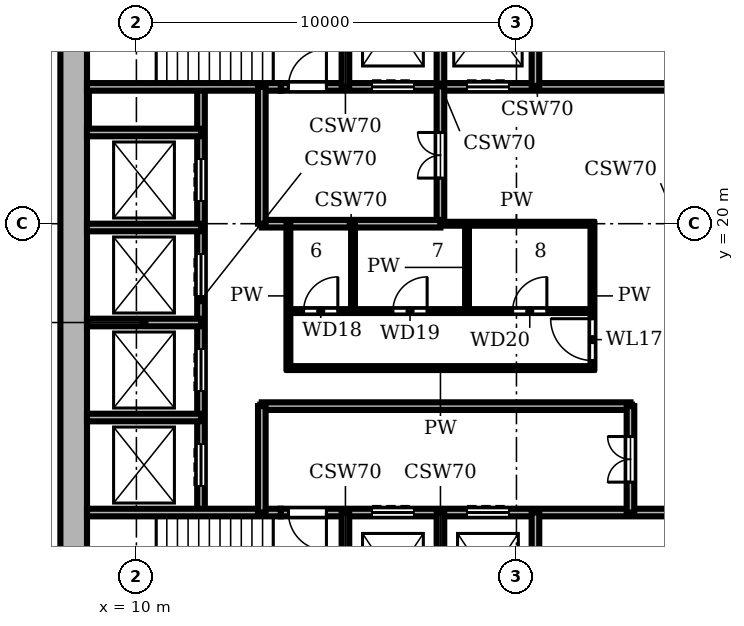
"""IFC4 building model, lengths in metres.
Left out: names, types, materials, properties, quantities, classifications, styles, units other than length and angle.
Written with IfcOpenShell. Run it as: python <this file> out.ifc"""

import sys

from ifc_helpers import new_model, si_unit, direction, frame, frame_2d, origin, place, context, subcontext, project, spatial, rectangle, extrude, element, fill, save


model = new_model("IFC4")
c1 = context("Model", 3, precision=1e-05, world=origin(), true_north=direction((0.0, 1.0)))
c2 = subcontext(c1, "Body", "Model", "MODEL_VIEW")
j1 = project(units=[si_unit("LENGTHUNIT", "METRE"), si_unit("PLANEANGLEUNIT", "RADIAN")], contexts=[c1])
p1 = place(None, origin())
s1 = spatial("IfcSite", under=j1, at=p1, CompositionType="ELEMENT")
p2 = place(p1, origin())
s2 = spatial("IfcBuilding", under=s1, at=p2, CompositionType="ELEMENT")
p3 = place(p2, frame((0.0, 0.0, 233.1)))
s3 = spatial("IfcBuildingStorey", under=s2, at=p3, CompositionType="ELEMENT", Elevation=233.1)
p4 = place(p3, frame((8.35, 27.3, 0.0), z_axis=(0.0, 0.0, 1.0), x_axis=(0.0, -1.0, 0.0)))
e1 = element("IfcWall", 1, at=p4, inside=s3, PredefinedType="SHEAR", context=c2, shape_type="SweptSolid", body=[
    extrude(rectangle(XDim=18.6, YDim=0.7, at=frame_2d((9.3, 0.0))), origin(), (0.0, 0.0, 1.0), 3.9),
])
p5 = place(p3, frame((8.7, 12.4, 0.0), z_axis=(0.0, 0.0, 1.0), x_axis=(1.0, 0.0, 0.0)))
e2 = element("IfcWall", 2, at=p5, inside=s3, PredefinedType="SHEAR", context=c2, shape_type="SweptSolid", body=[
    extrude(rectangle(XDim=5.1, YDim=0.2, at=frame_2d((2.55, 0.0))), origin(), (0.0, 0.0, 1.0), 3.45),
])
p6 = place(p3, frame((13.8, 12.4, 0.0), z_axis=(0.0, 0.0, 1.0), x_axis=(1.0, 0.0, 0.0)))
e3 = element("IfcWall", 3, at=p6, inside=s3, PredefinedType="SHEAR", context=c2, shape_type="SweptSolid", body=[
    extrude(rectangle(XDim=13.5, YDim=0.2, at=frame_2d((6.75, 0.0))), origin(), (0.0, 0.0, 1.0), 3.45),
])
p7 = place(p6, frame((2.4, 0.0, 0.0)))
e4 = element("IfcOpeningElement", 4, at=p7, cuts=e3, PredefinedType="OPENING", context=c2, shape_type="SweptSolid", body=[
    extrude(rectangle(XDim=1.1, YDim=2.1, at=frame_2d((0.55, 1.05))), frame((0.0, 0.11, 0.0), z_axis=(0.0, -1.0, 0.0), x_axis=(1.0, 0.0, 0.0)), (0.0, 0.0, 1.0), 0.22),
])
p8 = place(p6, frame((4.9, 0.0, 0.0)))
e5 = element("IfcOpeningElement", 5, at=p8, cuts=e3, PredefinedType="OPENING", context=c2, shape_type="SweptSolid", body=[
    extrude(rectangle(XDim=1.1, YDim=2.1, at=frame_2d((0.55, 1.05))), frame((0.0, 0.11, 0.0), z_axis=(0.0, -1.0, 0.0), x_axis=(1.0, 0.0, 0.0)), (0.0, 0.0, 1.0), 0.22),
])
p9 = place(p6, frame((0.2, 0.0, 0.0)))
e6 = element("IfcOpeningElement", 6, at=p9, cuts=e3, PredefinedType="OPENING", context=c2, shape_type="SweptSolid", body=[
    extrude(rectangle(XDim=1.0, YDim=2.1, at=frame_2d((0.5, 1.05))), frame((0.0, 0.11, 0.0), z_axis=(0.0, -1.0, 0.0), x_axis=(1.0, 0.0, 0.0)), (0.0, 0.0, 1.0), 0.22),
])
p10 = place(p3, frame((8.7, 14.9, 0.0), z_axis=(0.0, 0.0, 1.0), x_axis=(1.0, 0.0, 0.0)))
e7 = element("IfcWall", 7, at=p10, inside=s3, PredefinedType="SHEAR", context=c2, shape_type="SweptSolid", body=[
    extrude(rectangle(XDim=3.0, YDim=0.2, at=frame_2d((1.5, 0.0))), origin(), (0.0, 0.0, 1.0), 3.45),
])
p11 = place(p3, frame((13.3, 15.2, 0.0), z_axis=(0.0, 0.0, 1.0), x_axis=(1.0, 0.0, 0.0)))
e8 = element("IfcWall", 8, at=p11, inside=s3, PredefinedType="SHEAR", context=c2, shape_type="SweptSolid", body=[
    extrude(rectangle(XDim=9.7, YDim=0.2, at=frame_2d((4.85, 0.0))), origin(), (0.0, 0.0, 1.0), 3.45),
])
p12 = place(p3, frame((14.0, 16.2, 0.0), z_axis=(0.0, 0.0, 1.0), x_axis=(1.0, 0.0, 0.0)))
e9 = element("IfcWall", 9, at=p12, inside=s3, PredefinedType="PARTITIONING", context=c2, shape_type="SweptSolid", body=[
    extrude(rectangle(XDim=8.0, YDim=0.1, at=frame_2d((4.0, 0.0))), origin(), (0.0, 0.0, 1.0), 3.45),
])
p13 = place(p3, frame((8.7, 17.4, 0.0), z_axis=(0.0, 0.0, 1.0), x_axis=(1.0, 0.0, 0.0)))
e10 = element("IfcWall", 10, at=p13, inside=s3, PredefinedType="SHEAR", context=c2, shape_type="SweptSolid", body=[
    extrude(rectangle(XDim=3.0, YDim=0.2, at=frame_2d((1.5, 0.0))), origin(), (0.0, 0.0, 1.0), 3.45),
])
p14 = place(p3, frame((14.0, 17.7, 0.0), z_axis=(0.0, 0.0, 1.0), x_axis=(1.0, 0.0, 0.0)))
e11 = element("IfcWall", 11, at=p14, inside=s3, PredefinedType="PARTITIONING", context=c2, shape_type="SweptSolid", body=[
    extrude(rectangle(XDim=8.0, YDim=0.1, at=frame_2d((4.0, 0.0))), origin(), (0.0, 0.0, 1.0), 3.45),
])
p15 = place(p14, frame((0.4, 0.0, 0.0)))
e12 = element("IfcOpeningElement", 12, at=p15, cuts=e11, PredefinedType="OPENING", context=c2, shape_type="SweptSolid", body=[
    extrude(rectangle(XDim=0.9, YDim=2.1, at=frame_2d((0.45, 1.05))), frame((0.0, 0.06, 0.0), z_axis=(0.0, -1.0, 0.0), x_axis=(1.0, 0.0, 0.0)), (0.0, 0.0, 1.0), 0.12),
])
p16 = place(p14, frame((2.75, 0.0, 0.0)))
e13 = element("IfcOpeningElement", 13, at=p16, cuts=e11, PredefinedType="OPENING", context=c2, shape_type="SweptSolid", body=[
    extrude(rectangle(XDim=0.9, YDim=2.1, at=frame_2d((0.45, 1.05))), frame((0.0, 0.06, 0.0), z_axis=(0.0, -1.0, 0.0), x_axis=(1.0, 0.0, 0.0)), (0.0, 0.0, 1.0), 0.12),
])
p17 = place(p14, frame((5.9, 0.0, 0.0)))
e14 = element("IfcOpeningElement", 14, at=p17, cuts=e11, PredefinedType="OPENING", context=c2, shape_type="SweptSolid", body=[
    extrude(rectangle(XDim=0.9, YDim=2.1, at=frame_2d((0.45, 1.05))), frame((0.0, 0.06, 0.0), z_axis=(0.0, -1.0, 0.0), x_axis=(1.0, 0.0, 0.0)), (0.0, 0.0, 1.0), 0.12),
])
p18 = place(p3, frame((8.7, 19.9, 0.0), z_axis=(0.0, 0.0, 1.0), x_axis=(1.0, 0.0, 0.0)))
e15 = element("IfcWall", 15, at=p18, inside=s3, PredefinedType="SHEAR", context=c2, shape_type="SweptSolid", body=[
    extrude(rectangle(XDim=3.0, YDim=0.2, at=frame_2d((1.5, 0.0))), origin(), (0.0, 0.0, 1.0), 3.45),
])
p19 = place(p3, frame((18.0, 20.0, 0.0), z_axis=(0.0, 0.0, 1.0), x_axis=(1.0, 0.0, 0.0)))
e16 = element("IfcWall", 16, at=p19, inside=s3, PredefinedType="PARTITIONING", context=c2, shape_type="SweptSolid", body=[
    extrude(rectangle(XDim=4.0, YDim=0.1, at=frame_2d((2.0, 0.0))), origin(), (0.0, 0.0, 1.0), 3.45),
])
p20 = place(p3, frame((13.3, 20.0, 0.0), z_axis=(0.0, 0.0, 1.0), x_axis=(1.0, 0.0, 0.0)))
e17 = element("IfcWall", 17, at=p20, inside=s3, PredefinedType="SHEAR", context=c2, shape_type="SweptSolid", body=[
    extrude(rectangle(XDim=4.7, YDim=0.2, at=frame_2d((2.35, 0.0))), origin(), (0.0, 0.0, 1.0), 3.45),
])
p21 = place(p3, frame((8.7, 22.4, 0.0), z_axis=(0.0, 0.0, 1.0), x_axis=(1.0, 0.0, 0.0)))
e18 = element("IfcWall", 18, at=p21, inside=s3, PredefinedType="SHEAR", context=c2, shape_type="SweptSolid", body=[
    extrude(rectangle(XDim=3.0, YDim=0.2, at=frame_2d((1.5, 0.0))), origin(), (0.0, 0.0, 1.0), 3.45),
])
p22 = place(p3, frame((8.7, 23.6, 0.0), z_axis=(0.0, 0.0, 1.0), x_axis=(1.0, 0.0, 0.0)))
e19 = element("IfcWall", 19, at=p22, inside=s3, PredefinedType="SHEAR", context=c2, shape_type="SweptSolid", body=[
    extrude(rectangle(XDim=5.1, YDim=0.2, at=frame_2d((2.55, 0.0))), origin(), (0.0, 0.0, 1.0), 3.45),
])
p23 = place(p3, frame((13.8, 23.6, 0.0), z_axis=(0.0, 0.0, 1.0), x_axis=(1.0, 0.0, 0.0)))
e20 = element("IfcWall", 20, at=p23, inside=s3, PredefinedType="SHEAR", context=c2, shape_type="SweptSolid", body=[
    extrude(rectangle(XDim=13.5, YDim=0.2, at=frame_2d((6.75, 0.0))), origin(), (0.0, 0.0, 1.0), 3.45),
])
p24 = place(p23, frame((2.4, 0.0, 0.0)))
e21 = element("IfcOpeningElement", 21, at=p24, cuts=e20, PredefinedType="OPENING", context=c2, shape_type="SweptSolid", body=[
    extrude(rectangle(XDim=1.1, YDim=2.1, at=frame_2d((0.55, 1.05))), frame((0.0, 0.11, 0.0), z_axis=(0.0, -1.0, 0.0), x_axis=(1.0, 0.0, 0.0)), (0.0, 0.0, 1.0), 0.22),
])
p25 = place(p23, frame((4.9, 0.0, 0.0)))
e22 = element("IfcOpeningElement", 22, at=p25, cuts=e20, PredefinedType="OPENING", context=c2, shape_type="SweptSolid", body=[
    extrude(rectangle(XDim=1.1, YDim=2.1, at=frame_2d((0.55, 1.05))), frame((0.0, 0.11, 0.0), z_axis=(0.0, -1.0, 0.0), x_axis=(1.0, 0.0, 0.0)), (0.0, 0.0, 1.0), 0.22),
])
p26 = place(p23, frame((0.2, 0.0, 0.0)))
e23 = element("IfcOpeningElement", 23, at=p26, cuts=e20, PredefinedType="OPENING", context=c2, shape_type="SweptSolid", body=[
    extrude(rectangle(XDim=1.0, YDim=2.1, at=frame_2d((0.5, 1.05))), frame((0.0, 0.11, 0.0), z_axis=(0.0, -1.0, 0.0), x_axis=(1.0, 0.0, 0.0)), (0.0, 0.0, 1.0), 0.22),
])
p27 = place(p3, frame((11.7, 12.4, 0.0), z_axis=(0.0, 0.0, 1.0), x_axis=(0.0, 1.0, 0.0)))
e24 = element("IfcWall", 24, at=p27, inside=s3, PredefinedType="SHEAR", context=c2, shape_type="SweptSolid", body=[
    extrude(rectangle(XDim=11.2, YDim=0.2, at=frame_2d((5.6, 0.0))), origin(), (0.0, 0.0, 1.0), 3.45),
])
p28 = place(p27, frame((0.7, 0.0, 0.0)))
e25 = element("IfcOpeningElement", 25, at=p28, cuts=e24, PredefinedType="OPENING", context=c2, shape_type="SweptSolid", body=[
    extrude(rectangle(XDim=1.1, YDim=2.1, at=frame_2d((0.55, 1.05))), frame((0.0, 0.11, 0.0), z_axis=(0.0, -1.0, 0.0), x_axis=(1.0, 0.0, 0.0)), (0.0, 0.0, 1.0), 0.22),
])
p29 = place(p27, frame((3.2, 0.0, 0.0)))
e26 = element("IfcOpeningElement", 26, at=p29, cuts=e24, PredefinedType="OPENING", context=c2, shape_type="SweptSolid", body=[
    extrude(rectangle(XDim=1.1, YDim=2.1, at=frame_2d((0.55, 1.05))), frame((0.0, 0.11, 0.0), z_axis=(0.0, -1.0, 0.0), x_axis=(1.0, 0.0, 0.0)), (0.0, 0.0, 1.0), 0.22),
])
p30 = place(p27, frame((5.7, 0.0, 0.0)))
e27 = element("IfcOpeningElement", 27, at=p30, cuts=e24, PredefinedType="OPENING", context=c2, shape_type="SweptSolid", body=[
    extrude(rectangle(XDim=1.1, YDim=2.1, at=frame_2d((0.55, 1.05))), frame((0.0, 0.11, 0.0), z_axis=(0.0, -1.0, 0.0), x_axis=(1.0, 0.0, 0.0)), (0.0, 0.0, 1.0), 0.22),
])
p31 = place(p27, frame((8.2, 0.0, 0.0)))
e28 = element("IfcOpeningElement", 28, at=p31, cuts=e24, PredefinedType="OPENING", context=c2, shape_type="SweptSolid", body=[
    extrude(rectangle(XDim=1.1, YDim=2.1, at=frame_2d((0.55, 1.05))), frame((0.0, 0.11, 0.0), z_axis=(0.0, -1.0, 0.0), x_axis=(1.0, 0.0, 0.0)), (0.0, 0.0, 1.0), 0.22),
])
p32 = place(p3, frame((13.3, 12.4, 0.0), z_axis=(0.0, 0.0, 1.0), x_axis=(0.0, 1.0, 0.0)))
e29 = element("IfcWall", 29, at=p32, inside=s3, PredefinedType="SHEAR", context=c2, shape_type="SweptSolid", body=[
    extrude(rectangle(XDim=2.8, YDim=0.2, at=frame_2d((1.4, 0.0))), origin(), (0.0, 0.0, 1.0), 3.45),
])
p33 = place(p3, frame((13.3, 20.0, 0.0), z_axis=(0.0, 0.0, 1.0), x_axis=(0.0, 1.0, 0.0)))
e30 = element("IfcWall", 30, at=p33, inside=s3, PredefinedType="SHEAR", context=c2, shape_type="SweptSolid", body=[
    extrude(rectangle(XDim=3.6, YDim=0.2, at=frame_2d((1.8, 0.0))), origin(), (0.0, 0.0, 1.0), 3.45),
])
p34 = place(p3, frame((14.0, 16.2, 0.0), z_axis=(0.0, 0.0, 1.0), x_axis=(0.0, 1.0, 0.0)))
e31 = element("IfcWall", 31, at=p34, inside=s3, PredefinedType="PARTITIONING", context=c2, shape_type="SweptSolid", body=[
    extrude(rectangle(XDim=3.8, YDim=0.1, at=frame_2d((1.9, 0.0))), origin(), (0.0, 0.0, 1.0), 3.45),
])
for number, where, z_axis, x_axis in (
    (32, (15.5, 8.7, 0.0), (0.0, 0.0, 1.0), (0.0, 1.0, 0.0)),
    (33, (15.5, 23.6, 0.0), (0.0, 0.0, 1.0), (0.0, 1.0, 0.0)),
):
    element("IfcWall", number, at=place(p3, frame(where, z_axis=z_axis, x_axis=x_axis)), inside=s3, PredefinedType="SHEAR", context=c2, shape_type="SweptSolid", body=[
        extrude(rectangle(XDim=3.7, YDim=0.2, at=frame_2d((1.85, 0.0))), origin(), (0.0, 0.0, 1.0), 3.45),
    ])
p35 = place(p3, frame((15.7, 17.7, 0.0), z_axis=(0.0, 0.0, 1.0), x_axis=(0.0, 1.0, 0.0)))
e34 = element("IfcWall", 34, at=p35, inside=s3, PredefinedType="PARTITIONING", context=c2, shape_type="SweptSolid", body=[
    extrude(rectangle(XDim=2.3, YDim=0.1, at=frame_2d((1.15, 0.0))), origin(), (0.0, 0.0, 1.0), 3.45),
])
p36 = place(p3, frame((18.0, 8.7, 0.0), z_axis=(0.0, 0.0, 1.0), x_axis=(0.0, 1.0, 0.0)))
e35 = element("IfcWall", 35, at=p36, inside=s3, PredefinedType="SHEAR", context=c2, shape_type="SweptSolid", body=[
    extrude(rectangle(XDim=3.7, YDim=0.2, at=frame_2d((1.85, 0.0))), origin(), (0.0, 0.0, 1.0), 3.45),
])
p37 = place(p3, frame((18.0, 20.0, 0.0), z_axis=(0.0, 0.0, 1.0), x_axis=(0.0, 1.0, 0.0)))
e36 = element("IfcWall", 36, at=p37, inside=s3, PredefinedType="SHEAR", context=c2, shape_type="SweptSolid", body=[
    extrude(rectangle(XDim=7.3, YDim=0.2, at=frame_2d((3.65, 0.0))), origin(), (0.0, 0.0, 1.0), 3.45),
])
p38 = place(p37, frame((1.2, 0.0, 0.0)))
e37 = element("IfcOpeningElement", 37, at=p38, cuts=e36, PredefinedType="OPENING", context=c2, shape_type="SweptSolid", body=[
    extrude(rectangle(XDim=1.2, YDim=2.1, at=frame_2d((0.6, 1.05))), frame((0.0, 0.11, 0.0), z_axis=(0.0, -1.0, 0.0), x_axis=(1.0, 0.0, 0.0)), (0.0, 0.0, 1.0), 0.22),
])
p39 = place(p3, frame((18.7, 17.7, 0.0), z_axis=(0.0, 0.0, 1.0), x_axis=(0.0, 1.0, 0.0)))
e38 = element("IfcWall", 38, at=p39, inside=s3, PredefinedType="PARTITIONING", context=c2, shape_type="SweptSolid", body=[
    extrude(rectangle(XDim=2.3, YDim=0.1, at=frame_2d((1.15, 0.0))), origin(), (0.0, 0.0, 1.0), 3.45),
])
for number, where, z_axis, x_axis in (
    (39, (20.5, 8.7, 0.0), (0.0, 0.0, 1.0), (0.0, 1.0, 0.0)),
    (40, (20.5, 23.6, 0.0), (0.0, 0.0, 1.0), (0.0, 1.0, 0.0)),
):
    element("IfcWall", number, at=place(p3, frame(where, z_axis=z_axis, x_axis=x_axis)), inside=s3, PredefinedType="SHEAR", context=c2, shape_type="SweptSolid", body=[
        extrude(rectangle(XDim=3.7, YDim=0.2, at=frame_2d((1.85, 0.0))), origin(), (0.0, 0.0, 1.0), 3.45),
    ])
p40 = place(p3, frame((22.0, 16.2, 0.0), z_axis=(0.0, 0.0, 1.0), x_axis=(0.0, 1.0, 0.0)))
e41 = element("IfcWall", 41, at=p40, inside=s3, PredefinedType="PARTITIONING", context=c2, shape_type="SweptSolid", body=[
    extrude(rectangle(XDim=3.8, YDim=0.1, at=frame_2d((1.9, 0.0))), origin(), (0.0, 0.0, 1.0), 3.45),
])
p41 = place(p40, frame((0.2, 0.0, 0.0)))
e42 = element("IfcOpeningElement", 42, at=p41, cuts=e41, PredefinedType="OPENING", context=c2, shape_type="SweptSolid", body=[
    extrude(rectangle(XDim=1.1, YDim=2.1, at=frame_2d((0.55, 1.05))), frame((0.0, 0.06, 0.0), z_axis=(0.0, -1.0, 0.0), x_axis=(1.0, 0.0, 0.0)), (0.0, 0.0, 1.0), 0.12),
])
p42 = place(p3, frame((23.0, 12.4, 0.0), z_axis=(0.0, 0.0, 1.0), x_axis=(0.0, 1.0, 0.0)))
e43 = element("IfcWall", 43, at=p42, inside=s3, PredefinedType="SHEAR", context=c2, shape_type="SweptSolid", body=[
    extrude(rectangle(XDim=2.8, YDim=0.2, at=frame_2d((1.4, 0.0))), origin(), (0.0, 0.0, 1.0), 3.45),
])
p43 = place(p42, frame((0.8, 0.0, 0.0)))
e44 = element("IfcOpeningElement", 44, at=p43, cuts=e43, PredefinedType="OPENING", context=c2, shape_type="SweptSolid", body=[
    extrude(rectangle(XDim=1.2, YDim=2.1, at=frame_2d((0.6, 1.05))), frame((0.0, 0.11, 0.0), z_axis=(0.0, -1.0, 0.0), x_axis=(1.0, 0.0, 0.0)), (0.0, 0.0, 1.0), 0.22),
])
p44 = place(p28, origin())
e45 = element("IfcDoor", 45, at=p44, inside=s3, OperationType="DOUBLE_DOOR_SLIDING", PredefinedType="DOOR", context=c2, shape_type="SweptSolid", body=[
    extrude(rectangle(XDim=1.1, YDim=2.1, at=frame_2d((0.55, 1.05))), frame((0.0, 0.025, 0.0), z_axis=(0.0, -1.0, 0.0), x_axis=(1.0, 0.0, 0.0)), (0.0, 0.0, 1.0), 0.05),
])
fill(e25, e45)
p45 = place(p29, origin())
e46 = element("IfcDoor", 46, at=p45, inside=s3, OperationType="DOUBLE_DOOR_SLIDING", PredefinedType="DOOR", context=c2, shape_type="SweptSolid", body=[
    extrude(rectangle(XDim=1.1, YDim=2.1, at=frame_2d((0.55, 1.05))), frame((0.0, 0.025, 0.0), z_axis=(0.0, -1.0, 0.0), x_axis=(1.0, 0.0, 0.0)), (0.0, 0.0, 1.0), 0.05),
])
fill(e26, e46)
p46 = place(p30, origin())
e47 = element("IfcDoor", 47, at=p46, inside=s3, OperationType="DOUBLE_DOOR_SLIDING", PredefinedType="DOOR", context=c2, shape_type="SweptSolid", body=[
    extrude(rectangle(XDim=1.1, YDim=2.1, at=frame_2d((0.55, 1.05))), frame((0.0, 0.025, 0.0), z_axis=(0.0, -1.0, 0.0), x_axis=(1.0, 0.0, 0.0)), (0.0, 0.0, 1.0), 0.05),
])
fill(e27, e47)
p47 = place(p31, origin())
e48 = element("IfcDoor", 48, at=p47, inside=s3, OperationType="DOUBLE_DOOR_SLIDING", PredefinedType="DOOR", context=c2, shape_type="SweptSolid", body=[
    extrude(rectangle(XDim=1.1, YDim=2.1, at=frame_2d((0.55, 1.05))), frame((0.0, 0.025, 0.0), z_axis=(0.0, -1.0, 0.0), x_axis=(1.0, 0.0, 0.0)), (0.0, 0.0, 1.0), 0.05),
])
fill(e28, e48)
p48 = place(p7, origin())
e49 = element("IfcDoor", 49, at=p48, inside=s3, OperationType="DOUBLE_DOOR_SLIDING", PredefinedType="DOOR", context=c2, shape_type="SweptSolid", body=[
    extrude(rectangle(XDim=1.1, YDim=2.1, at=frame_2d((0.55, 1.05))), frame((0.0, 0.025, 0.0), z_axis=(0.0, -1.0, 0.0), x_axis=(1.0, 0.0, 0.0)), (0.0, 0.0, 1.0), 0.05),
])
fill(e4, e49)
p49 = place(p8, origin())
e50 = element("IfcDoor", 50, at=p49, inside=s3, OperationType="DOUBLE_DOOR_SLIDING", PredefinedType="DOOR", context=c2, shape_type="SweptSolid", body=[
    extrude(rectangle(XDim=1.1, YDim=2.1, at=frame_2d((0.55, 1.05))), frame((0.0, 0.025, 0.0), z_axis=(0.0, -1.0, 0.0), x_axis=(1.0, 0.0, 0.0)), (0.0, 0.0, 1.0), 0.05),
])
fill(e5, e50)
p50 = place(p24, origin())
e51 = element("IfcDoor", 51, at=p50, inside=s3, OperationType="DOUBLE_DOOR_SLIDING", PredefinedType="DOOR", context=c2, shape_type="SweptSolid", body=[
    extrude(rectangle(XDim=1.1, YDim=2.1, at=frame_2d((0.55, 1.05))), frame((0.0, 0.025, 0.0), z_axis=(0.0, -1.0, 0.0), x_axis=(1.0, 0.0, 0.0)), (0.0, 0.0, 1.0), 0.05),
])
fill(e21, e51)
p51 = place(p25, origin())
e52 = element("IfcDoor", 52, at=p51, inside=s3, OperationType="DOUBLE_DOOR_SLIDING", PredefinedType="DOOR", context=c2, shape_type="SweptSolid", body=[
    extrude(rectangle(XDim=1.1, YDim=2.1, at=frame_2d((0.55, 1.05))), frame((0.0, 0.025, 0.0), z_axis=(0.0, -1.0, 0.0), x_axis=(1.0, 0.0, 0.0)), (0.0, 0.0, 1.0), 0.05),
])
fill(e22, e52)
p52 = place(p9, frame((1.0, 0.0, 0.0), z_axis=(0.0, 0.0, 1.0), x_axis=(-1.0, 0.0, 0.0)))
e53 = element("IfcDoor", 53, at=p52, inside=s3, OperationType="SINGLE_SWING_LEFT", PredefinedType="DOOR", context=c2, shape_type="SweptSolid", body=[
    extrude(rectangle(XDim=1.0, YDim=2.1, at=frame_2d((0.5, 1.05))), frame((0.0, 0.025, 0.0), z_axis=(0.0, -1.0, 0.0), x_axis=(1.0, 0.0, 0.0)), (0.0, 0.0, 1.0), 0.05),
])
fill(e6, e53)
p53 = place(p26, origin())
e54 = element("IfcDoor", 54, at=p53, inside=s3, OperationType="SINGLE_SWING_RIGHT", PredefinedType="DOOR", context=c2, shape_type="SweptSolid", body=[
    extrude(rectangle(XDim=1.0, YDim=2.1, at=frame_2d((0.5, 1.05))), frame((0.0, 0.025, 0.0), z_axis=(0.0, -1.0, 0.0), x_axis=(1.0, 0.0, 0.0)), (0.0, 0.0, 1.0), 0.05),
])
fill(e23, e54)
p54 = place(p43, origin())
e55 = element("IfcDoor", 55, at=p54, inside=s3, OperationType="DOUBLE_DOOR_SINGLE_SWING", PredefinedType="DOOR", context=c2, shape_type="SweptSolid", body=[
    extrude(rectangle(XDim=1.2, YDim=2.1, at=frame_2d((0.6, 1.05))), frame((0.0, 0.025, 0.0), z_axis=(0.0, -1.0, 0.0), x_axis=(1.0, 0.0, 0.0)), (0.0, 0.0, 1.0), 0.05),
])
fill(e44, e55)
p55 = place(p38, origin())
e56 = element("IfcDoor", 56, at=p55, inside=s3, OperationType="DOUBLE_DOOR_SINGLE_SWING", PredefinedType="DOOR", context=c2, shape_type="SweptSolid", body=[
    extrude(rectangle(XDim=1.2, YDim=2.1, at=frame_2d((0.6, 1.05))), frame((0.0, 0.025, 0.0), z_axis=(0.0, -1.0, 0.0), x_axis=(1.0, 0.0, 0.0)), (0.0, 0.0, 1.0), 0.05),
])
fill(e37, e56)
p56 = place(p41, origin())
e57 = element("IfcDoor", 57, at=p56, inside=s3, OperationType="SINGLE_SWING_RIGHT", PredefinedType="DOOR", context=c2, shape_type="SweptSolid", body=[
    extrude(rectangle(XDim=1.1, YDim=2.1, at=frame_2d((0.55, 1.05))), frame((0.0, 0.025, 0.0), z_axis=(0.0, -1.0, 0.0), x_axis=(1.0, 0.0, 0.0)), (0.0, 0.0, 1.0), 0.05),
])
fill(e42, e57)
p57 = place(p15, origin())
e58 = element("IfcDoor", 58, at=p57, inside=s3, OperationType="SINGLE_SWING_RIGHT", PredefinedType="DOOR", context=c2, shape_type="SweptSolid", body=[
    extrude(rectangle(XDim=0.9, YDim=2.1, at=frame_2d((0.45, 1.05))), frame((0.0, 0.025, 0.0), z_axis=(0.0, -1.0, 0.0), x_axis=(1.0, 0.0, 0.0)), (0.0, 0.0, 1.0), 0.05),
])
fill(e12, e58)
p58 = place(p16, origin())
e59 = element("IfcDoor", 59, at=p58, inside=s3, OperationType="SINGLE_SWING_RIGHT", PredefinedType="DOOR", context=c2, shape_type="SweptSolid", body=[
    extrude(rectangle(XDim=0.9, YDim=2.1, at=frame_2d((0.45, 1.05))), frame((0.0, 0.025, 0.0), z_axis=(0.0, -1.0, 0.0), x_axis=(1.0, 0.0, 0.0)), (0.0, 0.0, 1.0), 0.05),
])
fill(e13, e59)
p59 = place(p17, origin())
e60 = element("IfcDoor", 60, at=p59, inside=s3, OperationType="SINGLE_SWING_RIGHT", PredefinedType="DOOR", context=c2, shape_type="SweptSolid", body=[
    extrude(rectangle(XDim=0.9, YDim=2.1, at=frame_2d((0.45, 1.05))), frame((0.0, 0.025, 0.0), z_axis=(0.0, -1.0, 0.0), x_axis=(1.0, 0.0, 0.0)), (0.0, 0.0, 1.0), 0.05),
])
fill(e14, e60)
save(model, sys.argv[1])
